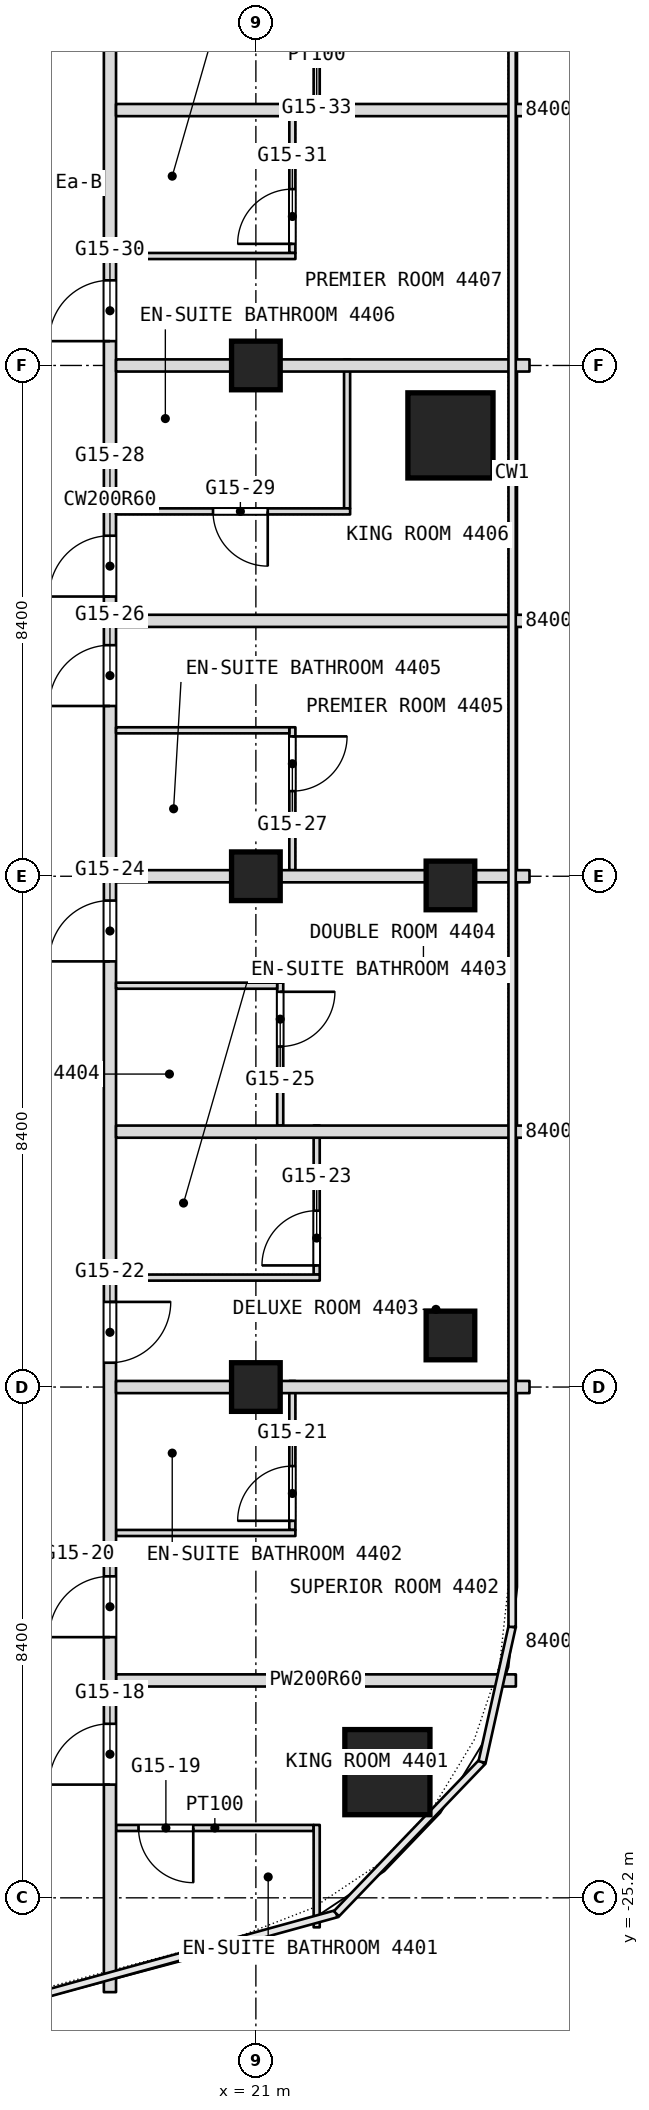
"""IFC4 building model, lengths in metres.
Left out: names, types, materials, properties, quantities, classifications, styles, units other than length and angle.
Written with IfcOpenShell. Run it as: python <this file> out.ifc"""

import sys

from ifc_helpers import new_model, si_unit, direction, frame, frame_2d, origin, origin_2d, place, context, subcontext, project, spatial, rectangle, extrude, element, fill, save


model = new_model("IFC4")
c1 = context("Model", 3, precision=1e-05, world=origin(), true_north=direction((0.0, 1.0)))
c2 = subcontext(c1, "Body", "Model", "MODEL_VIEW")
j1 = project(units=[si_unit("LENGTHUNIT", "METRE"), si_unit("PLANEANGLEUNIT", "RADIAN")], contexts=[c1])
p1 = place(None, origin())
s1 = spatial("IfcSite", under=j1, at=p1, CompositionType="ELEMENT")
p2 = place(p1, origin())
s2 = spatial("IfcBuilding", under=s1, at=p2, CompositionType="ELEMENT")
p3 = place(p2, frame((0.0, 0.0, 194.9)))
s3 = spatial("IfcBuildingStorey", under=s2, at=p3, CompositionType="ELEMENT", Elevation=194.9)
for number, where, z_axis, x_axis in (
    (1, (23.163, -23.133, 0.0), (0.0, 0.0, 1.0), (1.0, 0.0, 0.0)),
    (2, (24.2, -1.15, 0.0), (0.0, 0.0, 1.0), (1.0, 0.0, 0.0)),
):
    element("IfcColumn", number, at=place(p3, frame(where, z_axis=z_axis, x_axis=x_axis)), inside=s3, PredefinedType="COLUMN", context=c2, shape_type="SweptSolid", body=[
        extrude(rectangle(XDim=1.4, YDim=1.4, at=origin_2d()), origin(), (0.0, 0.0, 1.0), 3.6),
    ])
for number, where, z_axis, x_axis in (
    (3, (21.0, -16.8, 0.0), (0.0, 0.0, 1.0), (1.0, 0.0, 0.0)),
    (4, (21.0, -8.4, 0.0), (0.0, 0.0, 1.0), (1.0, 0.0, 0.0)),
    (5, (21.0, 0.0, 0.0), (0.0, 0.0, 1.0), (1.0, 0.0, 0.0)),
    (6, (24.2, -8.551, 0.0), (0.0, 0.0, 1.0), (1.0, 0.0, 0.0)),
    (7, (24.2, -15.952, 0.0), (0.0, 0.0, 1.0), (1.0, 0.0, 0.0)),
):
    element("IfcColumn", number, at=place(p3, frame(where, z_axis=z_axis, x_axis=x_axis)), inside=s3, PredefinedType="COLUMN", context=c2, shape_type="SweptSolid", body=[
        extrude(rectangle(XDim=0.8, YDim=0.8, at=origin_2d()), origin(), (0.0, 0.0, 1.0), 3.6),
    ])
p4 = place(p3, frame((18.7, -24.051, 0.0), z_axis=(0.0, 0.0, 1.0), x_axis=(1.0, 0.0, 0.0)))
e8 = element("IfcWall", 8, at=p4, inside=s3, PredefinedType="PARTITIONING", context=c2, shape_type="SweptSolid", body=[
    extrude(rectangle(XDim=3.25, YDim=0.1, at=frame_2d((1.625, 0.0))), origin(), (0.0, 0.0, 1.0), 3.34),
])
p5 = place(p4, frame((0.37, 0.0, 0.0)))
e9 = element("IfcOpeningElement", 9, at=p5, cuts=e8, PredefinedType="OPENING", context=c2, shape_type="SweptSolid", body=[
    extrude(rectangle(XDim=0.9, YDim=2.1, at=frame_2d((0.45, 1.05))), frame((0.0, 0.05, 0.0), z_axis=(0.0, -1.0, 0.0), x_axis=(1.0, 0.0, 0.0)), (0.0, 0.0, 1.0), 0.1),
])
p6 = place(p3, frame((22.5, -2.35, 0.0), z_axis=(0.0, 0.0, 1.0), x_axis=(0.0, 1.0, 0.0)))
e10 = element("IfcWall", 10, at=p6, inside=s3, PredefinedType="PARTITIONING", context=c2, shape_type="SweptSolid", body=[
    extrude(rectangle(XDim=2.45, YDim=0.1, at=frame_2d((1.225, 0.0))), origin(), (0.0, 0.0, 1.0), 3.34),
])
p7 = place(p3, frame((22.0, -25.685, 0.0), z_axis=(0.0, 0.0, 1.0), x_axis=(0.0, 1.0, 0.0)))
e11 = element("IfcWall", 11, at=p7, inside=s3, PredefinedType="PARTITIONING", context=c2, shape_type="SweptSolid", body=[
    extrude(rectangle(XDim=1.684, YDim=0.1, at=frame_2d((0.842, 0.0))), origin(), (0.0, 0.0, 1.0), 3.34),
])
p8 = place(p3, frame((22.0, -14.95, 0.0), z_axis=(0.0, 0.0, 1.0), x_axis=(0.0, 1.0, 0.0)))
e12 = element("IfcWall", 12, at=p8, inside=s3, PredefinedType="PARTITIONING", context=c2, shape_type="SweptSolid", body=[
    extrude(rectangle(XDim=2.45, YDim=0.1, at=frame_2d((1.225, 0.0))), origin(), (0.0, 0.0, 1.0), 3.34),
])
p9 = place(p8, frame((0.15, 0.0, 0.0)))
e13 = element("IfcOpeningElement", 13, at=p9, cuts=e12, PredefinedType="OPENING", context=c2, shape_type="SweptSolid", body=[
    extrude(rectangle(XDim=0.9, YDim=2.1, at=frame_2d((0.45, 1.05))), frame((0.0, 0.05, 0.0), z_axis=(0.0, -1.0, 0.0), x_axis=(1.0, 0.0, 0.0)), (0.0, 0.0, 1.0), 0.1),
])
p10 = place(p3, frame((22.0, 4.3, 0.0), z_axis=(0.0, 0.0, 1.0), x_axis=(0.0, 1.0, 0.0)))
e14 = element("IfcWall", 14, at=p10, inside=s3, PredefinedType="PARTITIONING", context=c2, shape_type="SweptSolid", body=[
    extrude(rectangle(XDim=2.35, YDim=0.1, at=frame_2d((1.175, 0.0))), origin(), (0.0, 0.0, 1.0), 3.34),
])
p11 = place(p10, frame((1.3, 0.0, 0.0)))
e15 = element("IfcOpeningElement", 15, at=p11, cuts=e14, PredefinedType="OPENING", context=c2, shape_type="SweptSolid", body=[
    extrude(rectangle(XDim=0.9, YDim=2.1, at=frame_2d((0.45, 1.05))), frame((0.0, 0.05, 0.0), z_axis=(0.0, -1.0, 0.0), x_axis=(1.0, 0.0, 0.0)), (0.0, 0.0, 1.0), 0.1),
])
p12 = place(p3, frame((18.7, -21.625, 0.0), z_axis=(0.0, 0.0, 1.0), x_axis=(1.0, 0.0, 0.0)))
e16 = element("IfcWall", 16, at=p12, inside=s3, PredefinedType="PARTITIONING", context=c2, shape_type="SweptSolid", body=[
    extrude(rectangle(XDim=6.576, YDim=0.2, at=frame_2d((3.288, 0.0))), origin(), (0.0, 0.0, 1.0), 3.34),
])
p13 = place(p3, frame((21.6, -19.15, 0.0), z_axis=(0.0, 0.0, 1.0), x_axis=(0.0, 1.0, 0.0)))
e17 = element("IfcWall", 17, at=p13, inside=s3, PredefinedType="PARTITIONING", context=c2, shape_type="SweptSolid", body=[
    extrude(rectangle(XDim=2.45, YDim=0.1, at=frame_2d((1.225, 0.0))), origin(), (0.0, 0.0, 1.0), 3.34),
])
p14 = place(p13, frame((0.15, 0.0, 0.0)))
e18 = element("IfcOpeningElement", 18, at=p14, cuts=e17, PredefinedType="OPENING", context=c2, shape_type="SweptSolid", body=[
    extrude(rectangle(XDim=0.9, YDim=2.1, at=frame_2d((0.45, 1.05))), frame((0.0, 0.05, 0.0), z_axis=(0.0, -1.0, 0.0), x_axis=(1.0, 0.0, 0.0)), (0.0, 0.0, 1.0), 0.1),
])
p15 = place(p3, frame((21.6, -8.3, 0.0), z_axis=(0.0, 0.0, 1.0), x_axis=(0.0, 1.0, 0.0)))
e19 = element("IfcWall", 19, at=p15, inside=s3, PredefinedType="PARTITIONING", context=c2, shape_type="SweptSolid", body=[
    extrude(rectangle(XDim=2.35, YDim=0.1, at=frame_2d((1.175, 0.0))), origin(), (0.0, 0.0, 1.0), 3.34),
])
p16 = place(p15, frame((1.3, 0.0, 0.0)))
e20 = element("IfcOpeningElement", 20, at=p16, cuts=e19, PredefinedType="OPENING", context=c2, shape_type="SweptSolid", body=[
    extrude(rectangle(XDim=0.9, YDim=2.1, at=frame_2d((0.45, 1.05))), frame((0.0, 0.05, 0.0), z_axis=(0.0, -1.0, 0.0), x_axis=(1.0, 0.0, 0.0)), (0.0, 0.0, 1.0), 0.1),
])
p17 = place(p3, frame((21.6, 1.85, 0.0), z_axis=(0.0, 0.0, 1.0), x_axis=(0.0, 1.0, 0.0)))
e21 = element("IfcWall", 21, at=p17, inside=s3, PredefinedType="PARTITIONING", context=c2, shape_type="SweptSolid", body=[
    extrude(rectangle(XDim=2.45, YDim=0.1, at=frame_2d((1.225, 0.0))), origin(), (0.0, 0.0, 1.0), 3.34),
])
p18 = place(p17, frame((0.15, 0.0, 0.0)))
e22 = element("IfcOpeningElement", 22, at=p18, cuts=e21, PredefinedType="OPENING", context=c2, shape_type="SweptSolid", body=[
    extrude(rectangle(XDim=0.9, YDim=2.1, at=frame_2d((0.45, 1.05))), frame((0.0, 0.05, 0.0), z_axis=(0.0, -1.0, 0.0), x_axis=(1.0, 0.0, 0.0)), (0.0, 0.0, 1.0), 0.1),
])
p19 = place(p3, frame((21.4, -12.5, 0.0), z_axis=(0.0, 0.0, 1.0), x_axis=(0.0, 1.0, 0.0)))
e23 = element("IfcWall", 23, at=p19, inside=s3, PredefinedType="PARTITIONING", context=c2, shape_type="SweptSolid", body=[
    extrude(rectangle(XDim=2.35, YDim=0.1, at=frame_2d((1.175, 0.0))), origin(), (0.0, 0.0, 1.0), 3.34),
])
p20 = place(p19, frame((1.3, 0.0, 0.0)))
e24 = element("IfcOpeningElement", 24, at=p20, cuts=e23, PredefinedType="OPENING", context=c2, shape_type="SweptSolid", body=[
    extrude(rectangle(XDim=0.9, YDim=2.1, at=frame_2d((0.45, 1.05))), frame((0.0, 0.05, 0.0), z_axis=(0.0, -1.0, 0.0), x_axis=(1.0, 0.0, 0.0)), (0.0, 0.0, 1.0), 0.1),
])
p21 = place(p3, frame((18.7, -19.2, 0.0), z_axis=(0.0, 0.0, 1.0), x_axis=(1.0, 0.0, 0.0)))
e25 = element("IfcWall", 25, at=p21, inside=s3, PredefinedType="PARTITIONING", context=c2, shape_type="SweptSolid", body=[
    extrude(rectangle(XDim=2.95, YDim=0.1, at=frame_2d((1.475, 0.0))), origin(), (0.0, 0.0, 1.0), 3.34),
])
p22 = place(p3, frame((18.6, -26.751, 0.0), z_axis=(0.0, 0.0, 1.0), x_axis=(0.0, 1.0, 0.0)))
e26 = element("IfcWall", 26, at=p22, inside=s3, PredefinedType="PARTITIONING", context=c2, shape_type="SweptSolid", body=[
    extrude(rectangle(XDim=49.091, YDim=0.2, at=frame_2d((24.545, 0.0))), origin(), (0.0, 0.0, 1.0), 3.34),
])
p23 = place(p22, frame((3.413, 0.0, 0.0)))
e27 = element("IfcOpeningElement", 27, at=p23, cuts=e26, PredefinedType="OPENING", context=c2, shape_type="SweptSolid", body=[
    extrude(rectangle(XDim=1.0, YDim=2.1, at=frame_2d((0.5, 1.05))), frame((0.0, 0.1, 0.0), z_axis=(0.0, -1.0, 0.0), x_axis=(1.0, 0.0, 0.0)), (0.0, 0.0, 1.0), 0.2),
])
p24 = place(p22, frame((5.838, 0.0, 0.0)))
e28 = element("IfcOpeningElement", 28, at=p24, cuts=e26, PredefinedType="OPENING", context=c2, shape_type="SweptSolid", body=[
    extrude(rectangle(XDim=1.0, YDim=2.1, at=frame_2d((0.5, 1.05))), frame((0.0, 0.1, 0.0), z_axis=(0.0, -1.0, 0.0), x_axis=(1.0, 0.0, 0.0)), (0.0, 0.0, 1.0), 0.2),
])
p25 = place(p22, frame((10.351, 0.0, 0.0)))
e29 = element("IfcOpeningElement", 29, at=p25, cuts=e26, PredefinedType="OPENING", context=c2, shape_type="SweptSolid", body=[
    extrude(rectangle(XDim=1.0, YDim=2.1, at=frame_2d((0.5, 1.05))), frame((0.0, 0.1, 0.0), z_axis=(0.0, -1.0, 0.0), x_axis=(1.0, 0.0, 0.0)), (0.0, 0.0, 1.0), 0.2),
])
p26 = place(p22, frame((16.951, 0.0, 0.0)))
e30 = element("IfcOpeningElement", 30, at=p26, cuts=e26, PredefinedType="OPENING", context=c2, shape_type="SweptSolid", body=[
    extrude(rectangle(XDim=1.0, YDim=2.1, at=frame_2d((0.5, 1.05))), frame((0.0, 0.1, 0.0), z_axis=(0.0, -1.0, 0.0), x_axis=(1.0, 0.0, 0.0)), (0.0, 0.0, 1.0), 0.2),
])
p27 = place(p22, frame((21.151, 0.0, 0.0)))
e31 = element("IfcOpeningElement", 31, at=p27, cuts=e26, PredefinedType="OPENING", context=c2, shape_type="SweptSolid", body=[
    extrude(rectangle(XDim=1.0, YDim=2.1, at=frame_2d((0.5, 1.05))), frame((0.0, 0.1, 0.0), z_axis=(0.0, -1.0, 0.0), x_axis=(1.0, 0.0, 0.0)), (0.0, 0.0, 1.0), 0.2),
])
p28 = place(p22, frame((22.951, 0.0, 0.0)))
e32 = element("IfcOpeningElement", 32, at=p28, cuts=e26, PredefinedType="OPENING", context=c2, shape_type="SweptSolid", body=[
    extrude(rectangle(XDim=1.0, YDim=2.1, at=frame_2d((0.5, 1.05))), frame((0.0, 0.1, 0.0), z_axis=(0.0, -1.0, 0.0), x_axis=(1.0, 0.0, 0.0)), (0.0, 0.0, 1.0), 0.2),
])
p29 = place(p22, frame((27.151, 0.0, 0.0)))
e33 = element("IfcOpeningElement", 33, at=p29, cuts=e26, PredefinedType="OPENING", context=c2, shape_type="SweptSolid", body=[
    extrude(rectangle(XDim=1.0, YDim=2.1, at=frame_2d((0.5, 1.05))), frame((0.0, 0.1, 0.0), z_axis=(0.0, -1.0, 0.0), x_axis=(1.0, 0.0, 0.0)), (0.0, 0.0, 1.0), 0.2),
])
p30 = place(p22, frame((33.751, 0.0, 0.0)))
e34 = element("IfcOpeningElement", 34, at=p30, cuts=e26, PredefinedType="OPENING", context=c2, shape_type="SweptSolid", body=[
    extrude(rectangle(XDim=1.0, YDim=2.1, at=frame_2d((0.5, 1.05))), frame((0.0, 0.1, 0.0), z_axis=(0.0, -1.0, 0.0), x_axis=(1.0, 0.0, 0.0)), (0.0, 0.0, 1.0), 0.2),
])
p31 = place(p22, frame((38.451, 0.0, 0.0)))
e35 = element("IfcOpeningElement", 35, at=p31, cuts=e26, PredefinedType="OPENING", context=c2, shape_type="SweptSolid", body=[
    extrude(rectangle(XDim=1.8, YDim=2.1, at=frame_2d((0.9, 1.05))), frame((0.0, 0.1, 0.0), z_axis=(0.0, -1.0, 0.0), x_axis=(1.0, 0.0, 0.0)), (0.0, 0.0, 1.0), 0.2),
])
p32 = place(p22, frame((44.051, 0.0, 0.0)))
e36 = element("IfcOpeningElement", 36, at=p32, cuts=e26, PredefinedType="OPENING", context=c2, shape_type="SweptSolid", body=[
    extrude(rectangle(XDim=1.0, YDim=2.1, at=frame_2d((0.5, 1.05))), frame((0.0, 0.1, 0.0), z_axis=(0.0, -1.0, 0.0), x_axis=(1.0, 0.0, 0.0)), (0.0, 0.0, 1.0), 0.2),
])
p33 = place(p3, frame((18.7, -16.8, 0.0), z_axis=(0.0, 0.0, 1.0), x_axis=(1.0, 0.0, 0.0)))
e37 = element("IfcWall", 37, at=p33, inside=s3, PredefinedType="PARTITIONING", context=c2, shape_type="SweptSolid", body=[
    extrude(rectangle(XDim=6.8, YDim=0.2, at=frame_2d((3.4, 0.0))), origin(), (0.0, 0.0, 1.0), 2.94),
])
p34 = place(p3, frame((18.7, -15.0, 0.0), z_axis=(0.0, 0.0, 1.0), x_axis=(1.0, 0.0, 0.0)))
e38 = element("IfcWall", 38, at=p34, inside=s3, PredefinedType="PARTITIONING", context=c2, shape_type="SweptSolid", body=[
    extrude(rectangle(XDim=3.35, YDim=0.1, at=frame_2d((1.675, 0.0))), origin(), (0.0, 0.0, 1.0), 3.34),
])
p35 = place(p3, frame((18.7, -12.6, 0.0), z_axis=(0.0, 0.0, 1.0), x_axis=(1.0, 0.0, 0.0)))
e39 = element("IfcWall", 39, at=p35, inside=s3, PredefinedType="PARTITIONING", context=c2, shape_type="SweptSolid", body=[
    extrude(rectangle(XDim=6.8, YDim=0.2, at=frame_2d((3.4, 0.0))), origin(), (0.0, 0.0, 1.0), 3.34),
])
p36 = place(p3, frame((18.7, -10.2, 0.0), z_axis=(0.0, 0.0, 1.0), x_axis=(1.0, 0.0, 0.0)))
e40 = element("IfcWall", 40, at=p36, inside=s3, PredefinedType="PARTITIONING", context=c2, shape_type="SweptSolid", body=[
    extrude(rectangle(XDim=2.65, YDim=0.1, at=frame_2d((1.325, 0.0))), origin(), (0.0, 0.0, 1.0), 3.34),
])
p37 = place(p3, frame((18.7, -8.4, 0.0), z_axis=(0.0, 0.0, 1.0), x_axis=(1.0, 0.0, 0.0)))
e41 = element("IfcWall", 41, at=p37, inside=s3, PredefinedType="PARTITIONING", context=c2, shape_type="SweptSolid", body=[
    extrude(rectangle(XDim=6.8, YDim=0.2, at=frame_2d((3.4, 0.0))), origin(), (0.0, 0.0, 1.0), 2.94),
])
p38 = place(p3, frame((18.7, -6.0, 0.0), z_axis=(0.0, 0.0, 1.0), x_axis=(1.0, 0.0, 0.0)))
e42 = element("IfcWall", 42, at=p38, inside=s3, PredefinedType="PARTITIONING", context=c2, shape_type="SweptSolid", body=[
    extrude(rectangle(XDim=2.85, YDim=0.1, at=frame_2d((1.425, 0.0))), origin(), (0.0, 0.0, 1.0), 3.34),
])
p39 = place(p3, frame((18.7, -4.2, 0.0), z_axis=(0.0, 0.0, 1.0), x_axis=(1.0, 0.0, 0.0)))
e43 = element("IfcWall", 43, at=p39, inside=s3, PredefinedType="PARTITIONING", context=c2, shape_type="SweptSolid", body=[
    extrude(rectangle(XDim=6.8, YDim=0.2, at=frame_2d((3.4, 0.0))), origin(), (0.0, 0.0, 1.0), 3.34),
])
p40 = place(p3, frame((18.7, -2.4, 0.0), z_axis=(0.0, 0.0, 1.0), x_axis=(1.0, 0.0, 0.0)))
e44 = element("IfcWall", 44, at=p40, inside=s3, PredefinedType="PARTITIONING", context=c2, shape_type="SweptSolid", body=[
    extrude(rectangle(XDim=3.85, YDim=0.1, at=frame_2d((1.925, 0.0))), origin(), (0.0, 0.0, 1.0), 3.34),
])
p41 = place(p40, frame((1.595, 0.0, 0.0)))
e45 = element("IfcOpeningElement", 45, at=p41, cuts=e44, PredefinedType="OPENING", context=c2, shape_type="SweptSolid", body=[
    extrude(rectangle(XDim=0.9, YDim=2.1, at=frame_2d((0.45, 1.05))), frame((0.0, 0.05, 0.0), z_axis=(0.0, -1.0, 0.0), x_axis=(1.0, 0.0, 0.0)), (0.0, 0.0, 1.0), 0.1),
])
p42 = place(p3, frame((18.7, 0.0, 0.0), z_axis=(0.0, 0.0, 1.0), x_axis=(1.0, 0.0, 0.0)))
e46 = element("IfcWall", 46, at=p42, inside=s3, PredefinedType="PARTITIONING", context=c2, shape_type="SweptSolid", body=[
    extrude(rectangle(XDim=6.8, YDim=0.2, at=frame_2d((3.4, 0.0))), origin(), (0.0, 0.0, 1.0), 2.94),
])
p43 = place(p3, frame((18.7, 1.8, 0.0), z_axis=(0.0, 0.0, 1.0), x_axis=(1.0, 0.0, 0.0)))
e47 = element("IfcWall", 47, at=p43, inside=s3, PredefinedType="PARTITIONING", context=c2, shape_type="SweptSolid", body=[
    extrude(rectangle(XDim=2.95, YDim=0.1, at=frame_2d((1.475, 0.0))), origin(), (0.0, 0.0, 1.0), 3.34),
])
p44 = place(p3, frame((18.7, 4.2, 0.0), z_axis=(0.0, 0.0, 1.0), x_axis=(1.0, 0.0, 0.0)))
e48 = element("IfcWall", 48, at=p44, inside=s3, PredefinedType="PARTITIONING", context=c2, shape_type="SweptSolid", body=[
    extrude(rectangle(XDim=6.8, YDim=0.2, at=frame_2d((3.4, 0.0))), origin(), (0.0, 0.0, 1.0), 3.34),
])
p45 = place(p5, origin())
e49 = element("IfcDoor", 49, at=p45, inside=s3, OperationType="SINGLE_SWING_RIGHT", PredefinedType="DOOR", context=c2, shape_type="SweptSolid", body=[
    extrude(rectangle(XDim=0.9, YDim=2.1, at=frame_2d((0.45, 1.05))), frame((0.0, 0.025, 0.0), z_axis=(0.0, -1.0, 0.0), x_axis=(1.0, 0.0, 0.0)), (0.0, 0.0, 1.0), 0.05),
])
fill(e9, e49)
p46 = place(p9, origin())
e50 = element("IfcDoor", 50, at=p46, inside=s3, OperationType="SINGLE_SWING_LEFT", PredefinedType="DOOR", context=c2, shape_type="SweptSolid", body=[
    extrude(rectangle(XDim=0.9, YDim=2.1, at=frame_2d((0.45, 1.05))), frame((0.0, 0.025, 0.0), z_axis=(0.0, -1.0, 0.0), x_axis=(1.0, 0.0, 0.0)), (0.0, 0.0, 1.0), 0.05),
])
fill(e13, e50)
p47 = place(p14, origin())
e51 = element("IfcDoor", 51, at=p47, inside=s3, OperationType="SINGLE_SWING_LEFT", PredefinedType="DOOR", context=c2, shape_type="SweptSolid", body=[
    extrude(rectangle(XDim=0.9, YDim=2.1, at=frame_2d((0.45, 1.05))), frame((0.0, 0.025, 0.0), z_axis=(0.0, -1.0, 0.0), x_axis=(1.0, 0.0, 0.0)), (0.0, 0.0, 1.0), 0.05),
])
fill(e18, e51)
p48 = place(p16, origin())
e52 = element("IfcDoor", 52, at=p48, inside=s3, OperationType="SINGLE_SWING_RIGHT", PredefinedType="DOOR", context=c2, shape_type="SweptSolid", body=[
    extrude(rectangle(XDim=0.9, YDim=2.1, at=frame_2d((0.45, 1.05))), frame((0.0, 0.025, 0.0), z_axis=(0.0, -1.0, 0.0), x_axis=(1.0, 0.0, 0.0)), (0.0, 0.0, 1.0), 0.05),
])
fill(e20, e52)
p49 = place(p18, origin())
e53 = element("IfcDoor", 53, at=p49, inside=s3, OperationType="SINGLE_SWING_LEFT", PredefinedType="DOOR", context=c2, shape_type="SweptSolid", body=[
    extrude(rectangle(XDim=0.9, YDim=2.1, at=frame_2d((0.45, 1.05))), frame((0.0, 0.025, 0.0), z_axis=(0.0, -1.0, 0.0), x_axis=(1.0, 0.0, 0.0)), (0.0, 0.0, 1.0), 0.05),
])
fill(e22, e53)
p50 = place(p20, origin())
e54 = element("IfcDoor", 54, at=p50, inside=s3, OperationType="SINGLE_SWING_RIGHT", PredefinedType="DOOR", context=c2, shape_type="SweptSolid", body=[
    extrude(rectangle(XDim=0.9, YDim=2.1, at=frame_2d((0.45, 1.05))), frame((0.0, 0.025, 0.0), z_axis=(0.0, -1.0, 0.0), x_axis=(1.0, 0.0, 0.0)), (0.0, 0.0, 1.0), 0.05),
])
fill(e24, e54)
p51 = place(p23, origin())
e55 = element("IfcDoor", 55, at=p51, inside=s3, OperationType="SINGLE_SWING_RIGHT", PredefinedType="DOOR", context=c2, shape_type="SweptSolid", body=[
    extrude(rectangle(XDim=1.0, YDim=2.1, at=frame_2d((0.5, 1.05))), frame((0.0, 0.025, 0.0), z_axis=(0.0, -1.0, 0.0), x_axis=(1.0, 0.0, 0.0)), (0.0, 0.0, 1.0), 0.05),
])
fill(e27, e55)
p52 = place(p24, origin())
e56 = element("IfcDoor", 56, at=p52, inside=s3, OperationType="SINGLE_SWING_RIGHT", PredefinedType="DOOR", context=c2, shape_type="SweptSolid", body=[
    extrude(rectangle(XDim=1.0, YDim=2.1, at=frame_2d((0.5, 1.05))), frame((0.0, 0.025, 0.0), z_axis=(0.0, -1.0, 0.0), x_axis=(1.0, 0.0, 0.0)), (0.0, 0.0, 1.0), 0.05),
])
fill(e28, e56)
p53 = place(p25, origin())
e57 = element("IfcDoor", 57, at=p53, inside=s3, OperationType="SINGLE_SWING_RIGHT", PredefinedType="DOOR", context=c2, shape_type="SweptSolid", body=[
    extrude(rectangle(XDim=1.0, YDim=2.1, at=frame_2d((0.5, 1.05))), frame((0.0, 0.025, 0.0), z_axis=(0.0, -1.0, 0.0), x_axis=(1.0, 0.0, 0.0)), (0.0, 0.0, 1.0), 0.05),
])
fill(e29, e57)
p54 = place(p26, origin())
e58 = element("IfcDoor", 58, at=p54, inside=s3, OperationType="SINGLE_SWING_RIGHT", PredefinedType="DOOR", context=c2, shape_type="SweptSolid", body=[
    extrude(rectangle(XDim=1.0, YDim=2.1, at=frame_2d((0.5, 1.05))), frame((0.0, 0.025, 0.0), z_axis=(0.0, -1.0, 0.0), x_axis=(1.0, 0.0, 0.0)), (0.0, 0.0, 1.0), 0.05),
])
fill(e30, e58)
p55 = place(p27, origin())
e59 = element("IfcDoor", 59, at=p55, inside=s3, OperationType="SINGLE_SWING_RIGHT", PredefinedType="DOOR", context=c2, shape_type="SweptSolid", body=[
    extrude(rectangle(XDim=1.0, YDim=2.1, at=frame_2d((0.5, 1.05))), frame((0.0, 0.025, 0.0), z_axis=(0.0, -1.0, 0.0), x_axis=(1.0, 0.0, 0.0)), (0.0, 0.0, 1.0), 0.05),
])
fill(e31, e59)
p56 = place(p28, origin())
e60 = element("IfcDoor", 60, at=p56, inside=s3, OperationType="SINGLE_SWING_RIGHT", PredefinedType="DOOR", context=c2, shape_type="SweptSolid", body=[
    extrude(rectangle(XDim=1.0, YDim=2.1, at=frame_2d((0.5, 1.05))), frame((0.0, 0.025, 0.0), z_axis=(0.0, -1.0, 0.0), x_axis=(1.0, 0.0, 0.0)), (0.0, 0.0, 1.0), 0.05),
])
fill(e32, e60)
p57 = place(p29, origin())
e61 = element("IfcDoor", 61, at=p57, inside=s3, OperationType="SINGLE_SWING_RIGHT", PredefinedType="DOOR", context=c2, shape_type="SweptSolid", body=[
    extrude(rectangle(XDim=1.0, YDim=2.1, at=frame_2d((0.5, 1.05))), frame((0.0, 0.025, 0.0), z_axis=(0.0, -1.0, 0.0), x_axis=(1.0, 0.0, 0.0)), (0.0, 0.0, 1.0), 0.05),
])
fill(e33, e61)
p58 = place(p41, origin())
e62 = element("IfcDoor", 62, at=p58, inside=s3, OperationType="SINGLE_SWING_RIGHT", PredefinedType="DOOR", context=c2, shape_type="SweptSolid", body=[
    extrude(rectangle(XDim=0.9, YDim=2.1, at=frame_2d((0.45, 1.05))), frame((0.0, 0.025, 0.0), z_axis=(0.0, -1.0, 0.0), x_axis=(1.0, 0.0, 0.0)), (0.0, 0.0, 1.0), 0.05),
])
fill(e45, e62)
save(model, sys.argv[1])
